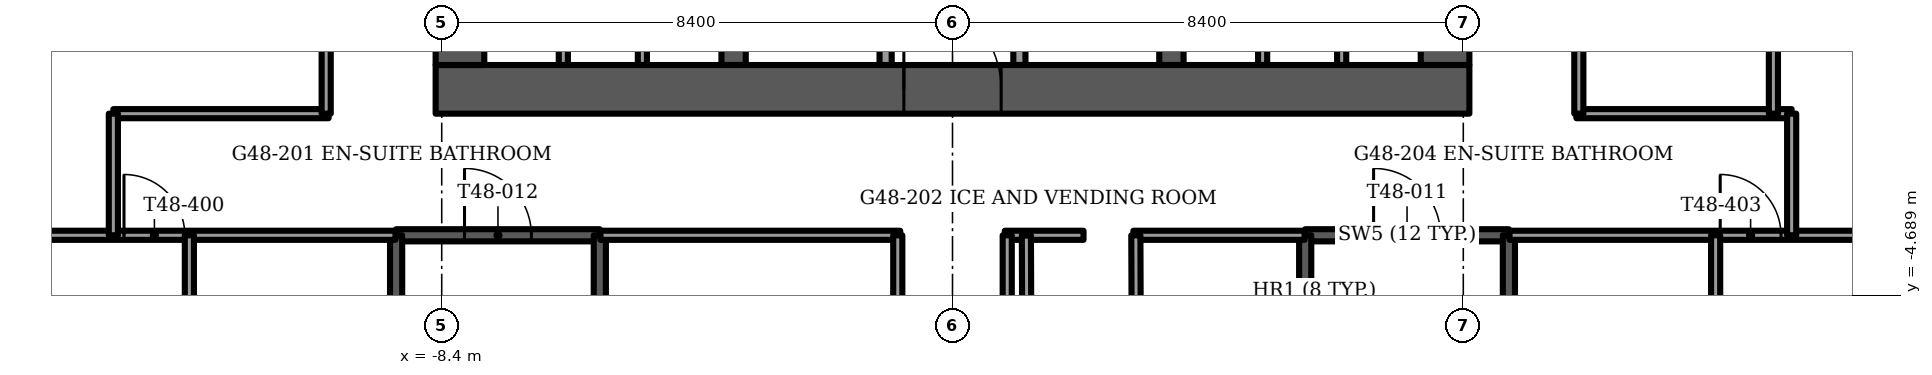
"""IFC4 building model, lengths in metres.
Left out: names, types, materials, properties, quantities, classifications, styles, units other than length and angle.
Written with IfcOpenShell. Run it as: python <this file> out.ifc"""

import sys

from ifc_helpers import new_model, si_unit, direction, frame, frame_2d, origin, place, context, subcontext, project, spatial, rectangle, extrude, element, fill, save


model = new_model("IFC4")
c1 = context("Model", 3, precision=1e-05, world=origin(), true_north=direction((0.0, 1.0)))
c2 = subcontext(c1, "Body", "Model", "MODEL_VIEW")
j1 = project(units=[si_unit("LENGTHUNIT", "METRE"), si_unit("PLANEANGLEUNIT", "RADIAN")], contexts=[c1])
p1 = place(None, origin())
s1 = spatial("IfcSite", under=j1, at=p1, CompositionType="ELEMENT")
p2 = place(p1, origin())
s2 = spatial("IfcBuilding", under=s1, at=p2, CompositionType="ELEMENT")
p3 = place(p2, frame((0.0, 0.0, 194.5)))
s3 = spatial("IfcBuildingStorey", under=s2, at=p3, CompositionType="ELEMENT", Elevation=194.5)
p4 = place(p3, frame((-8.5, -1.3, -0.3), z_axis=(0.0, 0.0, 1.0), x_axis=(1.0, 0.0, 0.0)))
e1 = element("IfcWall", 1, at=p4, inside=s3, PredefinedType="SHEAR", context=c2, shape_type="SweptSolid", body=[
    extrude(rectangle(XDim=17.0, YDim=0.8, at=frame_2d((8.5, 0.0))), origin(), (0.0, 0.0, 1.0), 3.75),
])
p5 = place(p4, frame((7.7, 0.0, 0.0)))
e2 = element("IfcOpeningElement", 2, at=p5, cuts=e1, PredefinedType="OPENING", context=c2, shape_type="SweptSolid", body=[
    extrude(rectangle(XDim=1.6, YDim=2.1, at=frame_2d((0.8, 1.05))), frame((0.0, 0.4, 0.0), z_axis=(0.0, -1.0, 0.0), x_axis=(1.0, 0.0, 0.0)), (0.0, 0.0, 1.0), 0.8),
])
p6 = place(p3, frame((-8.1, -0.9, -0.3), z_axis=(0.0, 0.0, 1.0), x_axis=(0.0, 1.0, 0.0)))
e3 = element("IfcWall", 3, at=p6, inside=s3, PredefinedType="SHEAR", context=c2, shape_type="SweptSolid", body=[
    extrude(rectangle(XDim=9.8, YDim=0.8, at=frame_2d((4.9, 0.0))), origin(), (0.0, 0.0, 1.0), 3.75),
])
p7 = place(p6, frame((8.15, 0.0, 0.0)))
e4 = element("IfcOpeningElement", 4, at=p7, cuts=e3, PredefinedType="OPENING", context=c2, shape_type="SweptSolid", body=[
    extrude(rectangle(XDim=1.1, YDim=2.1, at=frame_2d((0.55, 1.05))), frame((0.0, 0.4, 0.0), z_axis=(0.0, -1.0, 0.0), x_axis=(1.0, 0.0, 0.0)), (0.0, 0.0, 1.0), 0.8),
])
p8 = place(p3, frame((8.1, -0.9, -0.3), z_axis=(0.0, 0.0, 1.0), x_axis=(0.0, 1.0, 0.0)))
e5 = element("IfcWall", 5, at=p8, inside=s3, PredefinedType="SHEAR", context=c2, shape_type="SweptSolid", body=[
    extrude(rectangle(XDim=9.8, YDim=0.8, at=frame_2d((4.9, 0.0))), origin(), (0.0, 0.0, 1.0), 3.75),
])
p9 = place(p8, frame((8.15, 0.0, 0.0)))
e6 = element("IfcOpeningElement", 6, at=p9, cuts=e5, PredefinedType="OPENING", context=c2, shape_type="SweptSolid", body=[
    extrude(rectangle(XDim=1.1, YDim=2.1, at=frame_2d((0.55, 1.05))), frame((0.0, 0.4, 0.0), z_axis=(0.0, -1.0, 0.0), x_axis=(1.0, 0.0, 0.0)), (0.0, 0.0, 1.0), 0.8),
])
for number, where, z_axis, x_axis in (
    (7, (-3.6, -0.9, -0.3), (0.0, 0.0, 1.0), (0.0, 1.0, 0.0)),
    (8, (3.6, -0.9, -0.3), (0.0, 0.0, 1.0), (0.0, 1.0, 0.0)),
):
    element("IfcWall", number, at=place(p3, frame(where, z_axis=z_axis, x_axis=x_axis)), inside=s3, PredefinedType="SHEAR", context=c2, shape_type="SweptSolid", body=[
        extrude(rectangle(XDim=9.8, YDim=0.4, at=frame_2d((4.9, 0.0))), origin(), (0.0, 0.0, 1.0), 3.75),
    ])
p10 = place(p3, frame((-16.956, -1.482, 0.0), z_axis=(0.0, 0.0, 1.0), x_axis=(0.499996992154, -0.866027140358, 0.0)))
e9 = element("IfcWall", 9, at=p10, inside=s3, PredefinedType="SOLIDWALL", context=c2, shape_type="SweptSolid", body=[
    extrude(rectangle(XDim=10.264, YDim=0.15, at=frame_2d((5.132, 0.0))), origin(), (0.0, 0.0, 1.0), 3.45),
])
p11 = place(p10, frame((2.885, 0.0, 0.15)))
e10 = element("IfcOpeningElement", 10, at=p11, cuts=e9, PredefinedType="OPENING", context=c2, shape_type="SweptSolid", body=[
    extrude(rectangle(XDim=1.6, YDim=2.2, at=frame_2d((0.8, 1.1))), frame((0.0, 0.075, 0.0), z_axis=(0.0, -1.0, 0.0), x_axis=(1.0, 0.0, 0.0)), (0.0, 0.0, 1.0), 0.15),
])
p12 = place(p10, frame((5.395, 0.0, 0.15)))
e11 = element("IfcOpeningElement", 11, at=p12, cuts=e9, PredefinedType="OPENING", context=c2, shape_type="SweptSolid", body=[
    extrude(rectangle(XDim=0.9, YDim=2.2, at=frame_2d((0.45, 1.1))), frame((0.0, 0.075, 0.0), z_axis=(0.0, -1.0, 0.0), x_axis=(1.0, 0.0, 0.0)), (0.0, 0.0, 1.0), 0.15),
])
p13 = place(p10, frame((6.73, 0.0, 0.0)))
e12 = element("IfcOpeningElement", 12, at=p13, cuts=e9, PredefinedType="OPENING", context=c2, shape_type="SweptSolid", body=[
    extrude(rectangle(XDim=1.4, YDim=2.4, at=frame_2d((0.7, 1.2))), frame((0.0, 0.075, 0.0), z_axis=(0.0, -1.0, 0.0), x_axis=(1.0, 0.0, 0.0)), (0.0, 0.0, 1.0), 0.15),
])
p14 = place(p3, frame((11.824, -10.37, 0.0), z_axis=(0.0, 0.0, 1.0), x_axis=(0.499996992154, 0.866027140358, 0.0)))
e13 = element("IfcWall", 13, at=p14, inside=s3, PredefinedType="SOLIDWALL", context=c2, shape_type="SweptSolid", body=[
    extrude(rectangle(XDim=10.264, YDim=0.15, at=frame_2d((5.132, 0.0))), origin(), (0.0, 0.0, 1.0), 3.45),
])
p15 = place(p14, frame((1.269, 0.0, 0.15)))
e14 = element("IfcOpeningElement", 14, at=p15, cuts=e13, PredefinedType="OPENING", context=c2, shape_type="SweptSolid", body=[
    extrude(rectangle(XDim=1.6, YDim=2.2, at=frame_2d((0.8, 1.1))), frame((0.0, 0.075, 0.0), z_axis=(0.0, -1.0, 0.0), x_axis=(1.0, 0.0, 0.0)), (0.0, 0.0, 1.0), 0.15),
])
p16 = place(p14, frame((3.469, 0.0, 0.0)))
e15 = element("IfcOpeningElement", 15, at=p16, cuts=e13, PredefinedType="OPENING", context=c2, shape_type="SweptSolid", body=[
    extrude(rectangle(XDim=1.4, YDim=2.4, at=frame_2d((0.7, 1.2))), frame((0.0, 0.075, 0.0), z_axis=(0.0, -1.0, 0.0), x_axis=(1.0, 0.0, 0.0)), (0.0, 0.0, 1.0), 0.15),
])
p17 = place(p14, frame((5.469, 0.0, 0.15)))
e16 = element("IfcOpeningElement", 16, at=p17, cuts=e13, PredefinedType="OPENING", context=c2, shape_type="SweptSolid", body=[
    extrude(rectangle(XDim=1.6, YDim=2.2, at=frame_2d((0.8, 1.1))), frame((0.0, 0.075, 0.0), z_axis=(0.0, -1.0, 0.0), x_axis=(1.0, 0.0, 0.0)), (0.0, 0.0, 1.0), 0.15),
])
for number, where, z_axis, x_axis in (
    (17, (-1.1, -0.9, 0.0), (0.0, 0.0, 1.0), (0.0, 1.0, 0.0)),
    (18, (1.1, -0.9, 0.0), (0.0, 0.0, 1.0), (0.0, 1.0, 0.0)),
):
    element("IfcWall", number, at=place(p3, frame(where, z_axis=z_axis, x_axis=x_axis)), inside=s3, PredefinedType="PARTITIONING", context=c2, shape_type="SweptSolid", body=[
        extrude(rectangle(XDim=2.9, YDim=0.2, at=frame_2d((1.45, 0.0))), origin(), (0.0, 0.0, 1.0), 3.45),
    ])
for number, where, z_axis, x_axis in (
    (19, (-6.4, -0.9, 0.0), (0.0, 0.0, 1.0), (0.0, 1.0, 0.0)),
    (20, (-5.1, -0.9, 0.0), (0.0, 0.0, 1.0), (0.0, 1.0, 0.0)),
    (21, (5.1, -0.9, 0.0), (0.0, 0.0, 1.0), (0.0, 1.0, 0.0)),
    (22, (6.4, -0.9, 0.0), (0.0, 0.0, 1.0), (0.0, 1.0, 0.0)),
):
    element("IfcWall", number, at=place(p3, frame(where, z_axis=z_axis, x_axis=x_axis)), inside=s3, PredefinedType="PARTITIONING", context=c2, shape_type="SweptSolid", body=[
        extrude(rectangle(XDim=1.8, YDim=0.15, at=frame_2d((0.9, 0.0))), origin(), (0.0, 0.0, 1.0), 3.45),
    ])
p18 = place(p3, frame((5.8, -3.7, -0.3), z_axis=(0.0, 0.0, 1.0), x_axis=(1.0, 0.0, 0.0)))
e23 = element("IfcWall", 23, at=p18, inside=s3, PredefinedType="SOLIDWALL", context=c2, shape_type="SweptSolid", body=[
    extrude(rectangle(XDim=3.35, YDim=0.2, at=frame_2d((1.675, 0.0))), origin(), (0.0, 0.0, 1.0), 3.75),
])
p19 = place(p18, frame((1.125, 0.0, 0.0)))
e24 = element("IfcOpeningElement", 24, at=p19, cuts=e23, PredefinedType="OPENING", context=c2, shape_type="SweptSolid", body=[
    extrude(rectangle(XDim=1.1, YDim=2.1, at=frame_2d((0.55, 1.05))), frame((0.0, 0.1, 0.0), z_axis=(0.0, -1.0, 0.0), x_axis=(1.0, 0.0, 0.0)), (0.0, 0.0, 1.0), 0.2),
])
for number, where, z_axis, x_axis in (
    (25, (5.8, -3.7, -0.3), (0.0, 0.0, 1.0), (0.0, -1.0, 0.0)),
    (26, (9.15, -3.7, -0.3), (0.0, 0.0, 1.0), (0.0, -1.0, 0.0)),
):
    element("IfcWall", number, at=place(p3, frame(where, z_axis=z_axis, x_axis=x_axis)), inside=s3, PredefinedType="SOLIDWALL", context=c2, shape_type="SweptSolid", body=[
        extrude(rectangle(XDim=7.7, YDim=0.2, at=frame_2d((3.85, 0.0))), origin(), (0.0, 0.0, 1.0), 3.75),
    ])
p20 = place(p3, frame((-9.15, -3.7, -0.3), z_axis=(0.0, 0.0, 1.0), x_axis=(1.0, 0.0, 0.0)))
e27 = element("IfcWall", 27, at=p20, inside=s3, PredefinedType="SOLIDWALL", context=c2, shape_type="SweptSolid", body=[
    extrude(rectangle(XDim=3.35, YDim=0.2, at=frame_2d((1.675, 0.0))), origin(), (0.0, 0.0, 1.0), 3.75),
])
p21 = place(p20, frame((1.125, 0.0, 0.0)))
e28 = element("IfcOpeningElement", 28, at=p21, cuts=e27, PredefinedType="OPENING", context=c2, shape_type="SweptSolid", body=[
    extrude(rectangle(XDim=1.1, YDim=2.1, at=frame_2d((0.55, 1.05))), frame((0.0, 0.1, 0.0), z_axis=(0.0, -1.0, 0.0), x_axis=(1.0, 0.0, 0.0)), (0.0, 0.0, 1.0), 0.2),
])
for number, where, z_axis, x_axis in (
    (29, (-9.15, -3.7, -0.3), (0.0, 0.0, 1.0), (0.0, -1.0, 0.0)),
    (30, (-5.8, -3.7, -0.3), (0.0, 0.0, 1.0), (0.0, -1.0, 0.0)),
):
    element("IfcWall", number, at=place(p3, frame(where, z_axis=z_axis, x_axis=x_axis)), inside=s3, PredefinedType="SOLIDWALL", context=c2, shape_type="SweptSolid", body=[
        extrude(rectangle(XDim=7.7, YDim=0.2, at=frame_2d((3.85, 0.0))), origin(), (0.0, 0.0, 1.0), 3.75),
    ])
p22 = place(p3, frame((-15.727, -3.7, 0.0), z_axis=(0.0, 0.0, 1.0), x_axis=(1.0, 0.0, 0.0)))
e31 = element("IfcWall", 31, at=p22, inside=s3, PredefinedType="PARTITIONING", context=c2, shape_type="SweptSolid", body=[
    extrude(rectangle(XDim=6.567, YDim=0.15, at=frame_2d((3.284, 0.0))), origin(), (0.0, 0.0, 1.0), 3.45),
])
p23 = place(p22, frame((2.102, 0.0, 0.0)))
e32 = element("IfcOpeningElement", 32, at=p23, cuts=e31, PredefinedType="OPENING", context=c2, shape_type="SweptSolid", body=[
    extrude(rectangle(XDim=1.0, YDim=2.1, at=frame_2d((0.5, 1.05))), frame((0.0, 0.075, 0.0), z_axis=(0.0, -1.0, 0.0), x_axis=(1.0, 0.0, 0.0)), (0.0, 0.0, 1.0), 0.15),
])
p24 = place(p3, frame((-5.79, -3.7, 0.0), z_axis=(0.0, 0.0, 1.0), x_axis=(1.0, 0.0, 0.0)))
e33 = element("IfcWall", 33, at=p24, inside=s3, PredefinedType="PARTITIONING", context=c2, shape_type="SweptSolid", body=[
    extrude(rectangle(XDim=4.93, YDim=0.15, at=frame_2d((2.465, 0.0))), origin(), (0.0, 0.0, 1.0), 3.45),
])
p25 = place(p3, frame((0.86, -3.7, 0.0), z_axis=(0.0, 0.0, 1.0), x_axis=(1.0, 0.0, 0.0)))
e34 = element("IfcWall", 34, at=p25, inside=s3, PredefinedType="PARTITIONING", context=c2, shape_type="SweptSolid", body=[
    extrude(rectangle(XDim=1.295, YDim=0.15, at=frame_2d((0.647, 0.0))), origin(), (0.0, 0.0, 1.0), 3.45),
])
p26 = place(p3, frame((2.975, -3.7, 0.0), z_axis=(0.0, 0.0, 1.0), x_axis=(1.0, 0.0, 0.0)))
e35 = element("IfcWall", 35, at=p26, inside=s3, PredefinedType="PARTITIONING", context=c2, shape_type="SweptSolid", body=[
    extrude(rectangle(XDim=2.815, YDim=0.15, at=frame_2d((1.407, 0.0))), origin(), (0.0, 0.0, 1.0), 3.45),
])
p27 = place(p3, frame((9.16, -3.7, 0.0), z_axis=(0.0, 0.0, 1.0), x_axis=(1.0, 0.0, 0.0)))
e36 = element("IfcWall", 36, at=p27, inside=s3, PredefinedType="PARTITIONING", context=c2, shape_type="SweptSolid", body=[
    extrude(rectangle(XDim=6.567, YDim=0.15, at=frame_2d((3.284, 0.0))), origin(), (0.0, 0.0, 1.0), 3.45),
])
p28 = place(p27, frame((3.465, 0.0, 0.0)))
e37 = element("IfcOpeningElement", 37, at=p28, cuts=e36, PredefinedType="OPENING", context=c2, shape_type="SweptSolid", body=[
    extrude(rectangle(XDim=1.0, YDim=2.1, at=frame_2d((0.5, 1.05))), frame((0.0, 0.075, 0.0), z_axis=(0.0, -1.0, 0.0), x_axis=(1.0, 0.0, 0.0)), (0.0, 0.0, 1.0), 0.15),
])
for number, where, z_axis, x_axis in (
    (38, (-13.8, -1.7, 0.0), (0.0, 0.0, 1.0), (1.0, 0.0, 0.0)),
    (39, (10.26, -1.7, 0.0), (0.0, 0.0, 1.0), (1.0, 0.0, 0.0)),
):
    element("IfcWall", number, at=place(p3, frame(where, z_axis=z_axis, x_axis=x_axis)), inside=s3, PredefinedType="PARTITIONING", context=c2, shape_type="SweptSolid", body=[
        extrude(rectangle(XDim=3.54, YDim=0.15, at=frame_2d((1.77, 0.0))), origin(), (0.0, 0.0, 1.0), 3.45),
    ])
p29 = place(p3, frame((13.8, -3.7, 0.0), z_axis=(0.0, 0.0, 1.0), x_axis=(0.0, 1.0, 0.0)))
e40 = element("IfcWall", 40, at=p29, inside=s3, PredefinedType="PARTITIONING", context=c2, shape_type="SweptSolid", body=[
    extrude(rectangle(XDim=2.0, YDim=0.15, at=frame_2d((1.0, 0.0))), origin(), (0.0, 0.0, 1.0), 3.45),
])
p30 = place(p3, frame((13.5, -1.7, 0.0), z_axis=(0.0, 0.0, 1.0), x_axis=(0.0, 1.0, 0.0)))
e41 = element("IfcWall", 41, at=p30, inside=s3, PredefinedType="PARTITIONING", context=c2, shape_type="SweptSolid", body=[
    extrude(rectangle(XDim=2.6, YDim=0.15, at=frame_2d((1.3, 0.0))), origin(), (0.0, 0.0, 1.0), 3.45),
])
p31 = place(p3, frame((12.55, -6.7, 0.0), z_axis=(0.0, 0.0, 1.0), x_axis=(0.0, 1.0, 0.0)))
e42 = element("IfcWall", 42, at=p31, inside=s3, PredefinedType="PARTITIONING", context=c2, shape_type="SweptSolid", body=[
    extrude(rectangle(XDim=3.0, YDim=0.15, at=frame_2d((1.5, 0.0))), origin(), (0.0, 0.0, 1.0), 3.45),
])
p32 = place(p31, frame((1.1, 0.0, 0.0)))
e43 = element("IfcOpeningElement", 43, at=p32, cuts=e42, PredefinedType="OPENING", context=c2, shape_type="SweptSolid", body=[
    extrude(rectangle(XDim=0.8, YDim=2.1, at=frame_2d((0.4, 1.05))), frame((0.0, 0.075, 0.0), z_axis=(0.0, -1.0, 0.0), x_axis=(1.0, 0.0, 0.0)), (0.0, 0.0, 1.0), 0.15),
])
p33 = place(p3, frame((10.3, -1.7, 0.0), z_axis=(0.0, 0.0, 1.0), x_axis=(0.0, 1.0, 0.0)))
e44 = element("IfcWall", 44, at=p33, inside=s3, PredefinedType="PARTITIONING", context=c2, shape_type="SweptSolid", body=[
    extrude(rectangle(XDim=8.1, YDim=0.15, at=frame_2d((4.05, 0.0))), origin(), (0.0, 0.0, 1.0), 3.45),
])
p34 = place(p33, frame((3.66, 0.0, 0.0)))
e45 = element("IfcOpeningElement", 45, at=p34, cuts=e44, PredefinedType="OPENING", context=c2, shape_type="SweptSolid", body=[
    extrude(rectangle(XDim=1.0, YDim=2.1, at=frame_2d((0.5, 1.05))), frame((0.0, 0.075, 0.0), z_axis=(0.0, -1.0, 0.0), x_axis=(1.0, 0.0, 0.0)), (0.0, 0.0, 1.0), 0.15),
])
p35 = place(p33, frame((6.75, 0.0, 0.0)))
e46 = element("IfcOpeningElement", 46, at=p35, cuts=e44, PredefinedType="OPENING", context=c2, shape_type="SweptSolid", body=[
    extrude(rectangle(XDim=1.0, YDim=2.1, at=frame_2d((0.5, 1.05))), frame((0.0, 0.075, 0.0), z_axis=(0.0, -1.0, 0.0), x_axis=(1.0, 0.0, 0.0)), (0.0, 0.0, 1.0), 0.15),
])
for number, where, z_axis, x_axis in (
    (47, (0.9, -8.535, 0.0), (0.0, 0.0, 1.0), (0.0, 1.0, 0.0)),
    (48, (-0.9, -8.535, 0.0), (0.0, 0.0, 1.0), (0.0, 1.0, 0.0)),
):
    element("IfcWall", number, at=place(p3, frame(where, z_axis=z_axis, x_axis=x_axis)), inside=s3, PredefinedType="PARTITIONING", context=c2, shape_type="SweptSolid", body=[
        extrude(rectangle(XDim=4.835, YDim=0.15, at=frame_2d((2.417, 0.0))), origin(), (0.0, 0.0, 1.0), 3.45),
    ])
p36 = place(p3, frame((-10.3, -1.7, 0.0), z_axis=(0.0, 0.0, 1.0), x_axis=(0.0, 1.0, 0.0)))
e49 = element("IfcWall", 49, at=p36, inside=s3, PredefinedType="PARTITIONING", context=c2, shape_type="SweptSolid", body=[
    extrude(rectangle(XDim=8.1, YDim=0.15, at=frame_2d((4.05, 0.0))), origin(), (0.0, 0.0, 1.0), 3.45),
])
p37 = place(p36, frame((3.55, 0.0, 0.0)))
e50 = element("IfcOpeningElement", 50, at=p37, cuts=e49, PredefinedType="OPENING", context=c2, shape_type="SweptSolid", body=[
    extrude(rectangle(XDim=1.0, YDim=2.1, at=frame_2d((0.5, 1.05))), frame((0.0, 0.075, 0.0), z_axis=(0.0, -1.0, 0.0), x_axis=(1.0, 0.0, 0.0)), (0.0, 0.0, 1.0), 0.15),
])
p38 = place(p3, frame((-12.55, -6.7, 0.0), z_axis=(0.0, 0.0, 1.0), x_axis=(0.0, 1.0, 0.0)))
e51 = element("IfcWall", 51, at=p38, inside=s3, PredefinedType="PARTITIONING", context=c2, shape_type="SweptSolid", body=[
    extrude(rectangle(XDim=3.0, YDim=0.15, at=frame_2d((1.5, 0.0))), origin(), (0.0, 0.0, 1.0), 3.45),
])
p39 = place(p38, frame((1.1, 0.0, 0.0)))
e52 = element("IfcOpeningElement", 52, at=p39, cuts=e51, PredefinedType="OPENING", context=c2, shape_type="SweptSolid", body=[
    extrude(rectangle(XDim=0.8, YDim=2.1, at=frame_2d((0.4, 1.05))), frame((0.0, 0.075, 0.0), z_axis=(0.0, -1.0, 0.0), x_axis=(1.0, 0.0, 0.0)), (0.0, 0.0, 1.0), 0.15),
])
p40 = place(p3, frame((-13.8, -3.7, 0.0), z_axis=(0.0, 0.0, 1.0), x_axis=(0.0, 1.0, 0.0)))
e53 = element("IfcWall", 53, at=p40, inside=s3, PredefinedType="PARTITIONING", context=c2, shape_type="SweptSolid", body=[
    extrude(rectangle(XDim=2.0, YDim=0.15, at=frame_2d((1.0, 0.0))), origin(), (0.0, 0.0, 1.0), 3.45),
])
p41 = place(p3, frame((3.034, -8.395, 0.0), z_axis=(0.0, 0.0, 1.0), x_axis=(-0.004055917967, 0.999991774731, 0.0)))
e54 = element("IfcWall", 54, at=p41, inside=s3, PredefinedType="PARTITIONING", context=c2, shape_type="SweptSolid", body=[
    extrude(rectangle(XDim=4.695, YDim=0.15, at=frame_2d((2.348, 0.0))), origin(), (0.0, 0.0, 1.0), 3.45),
])
p42 = place(p41, frame((1.778, 0.0, 0.0)))
e55 = element("IfcOpeningElement", 55, at=p42, cuts=e54, PredefinedType="OPENING", context=c2, shape_type="SweptSolid", body=[
    extrude(rectangle(XDim=1.0, YDim=2.1, at=frame_2d((0.5, 1.05))), frame((0.0, 0.075, 0.0), z_axis=(0.0, -1.0, 0.0), x_axis=(1.0, 0.0, 0.0)), (0.0, 0.0, 1.0), 0.15),
])
p43 = place(p3, frame((1.234, -8.395, 0.0), z_axis=(0.0, 0.0, 1.0), x_axis=(-0.004008296795, 0.999991966746, 0.0)))
e56 = element("IfcWall", 56, at=p43, inside=s3, PredefinedType="PARTITIONING", context=c2, shape_type="SweptSolid", body=[
    extrude(rectangle(XDim=4.69, YDim=0.15, at=frame_2d((2.345, 0.0))), origin(), (0.0, 0.0, 1.0), 3.45),
])
p44 = place(p11, origin())
e57 = element("IfcWindow", 57, at=p44, inside=s3, PartitioningType="SINGLE_PANEL", PredefinedType="WINDOW", context=c2, shape_type="SweptSolid", body=[
    extrude(rectangle(XDim=1.6, YDim=2.2, at=frame_2d((0.8, 1.1))), frame((0.0, 0.03, 0.0), z_axis=(0.0, -1.0, 0.0), x_axis=(1.0, 0.0, 0.0)), (0.0, 0.0, 1.0), 0.06),
])
fill(e10, e57)
p45 = place(p17, origin())
e58 = element("IfcWindow", 58, at=p45, inside=s3, PartitioningType="SINGLE_PANEL", PredefinedType="WINDOW", context=c2, shape_type="SweptSolid", body=[
    extrude(rectangle(XDim=1.6, YDim=2.2, at=frame_2d((0.8, 1.1))), frame((0.0, 0.03, 0.0), z_axis=(0.0, -1.0, 0.0), x_axis=(1.0, 0.0, 0.0)), (0.0, 0.0, 1.0), 0.06),
])
fill(e16, e58)
p46 = place(p5, origin())
e59 = element("IfcDoor", 59, at=p46, inside=s3, OperationType="DOUBLE_DOOR_SINGLE_SWING", PredefinedType="DOOR", context=c2, shape_type="SweptSolid", body=[
    extrude(rectangle(XDim=1.6, YDim=2.1, at=frame_2d((0.8, 1.05))), frame((0.0, 0.025, 0.0), z_axis=(0.0, -1.0, 0.0), x_axis=(1.0, 0.0, 0.0)), (0.0, 0.0, 1.0), 0.05),
])
fill(e2, e59)
p47 = place(p19, origin())
e60 = element("IfcDoor", 60, at=p47, inside=s3, OperationType="SINGLE_SWING_LEFT", PredefinedType="DOOR", context=c2, shape_type="SweptSolid", body=[
    extrude(rectangle(XDim=1.1, YDim=2.1, at=frame_2d((0.55, 1.05))), frame((0.0, 0.025, 0.0), z_axis=(0.0, -1.0, 0.0), x_axis=(1.0, 0.0, 0.0)), (0.0, 0.0, 1.0), 0.05),
])
fill(e24, e60)
p48 = place(p21, origin())
e61 = element("IfcDoor", 61, at=p48, inside=s3, OperationType="SINGLE_SWING_LEFT", PredefinedType="DOOR", context=c2, shape_type="SweptSolid", body=[
    extrude(rectangle(XDim=1.1, YDim=2.1, at=frame_2d((0.55, 1.05))), frame((0.0, 0.025, 0.0), z_axis=(0.0, -1.0, 0.0), x_axis=(1.0, 0.0, 0.0)), (0.0, 0.0, 1.0), 0.05),
])
fill(e28, e61)
p49 = place(p23, origin())
e62 = element("IfcDoor", 62, at=p49, inside=s3, OperationType="SINGLE_SWING_LEFT", PredefinedType="DOOR", context=c2, shape_type="SweptSolid", body=[
    extrude(rectangle(XDim=1.0, YDim=2.1, at=frame_2d((0.5, 1.05))), frame((0.0, 0.025, 0.0), z_axis=(0.0, -1.0, 0.0), x_axis=(1.0, 0.0, 0.0)), (0.0, 0.0, 1.0), 0.05),
])
fill(e32, e62)
p50 = place(p28, origin())
e63 = element("IfcDoor", 63, at=p50, inside=s3, OperationType="SINGLE_SWING_RIGHT", PredefinedType="DOOR", context=c2, shape_type="SweptSolid", body=[
    extrude(rectangle(XDim=1.0, YDim=2.1, at=frame_2d((0.5, 1.05))), frame((0.0, 0.025, 0.0), z_axis=(0.0, -1.0, 0.0), x_axis=(1.0, 0.0, 0.0)), (0.0, 0.0, 1.0), 0.05),
])
fill(e37, e63)
save(model, sys.argv[1])
